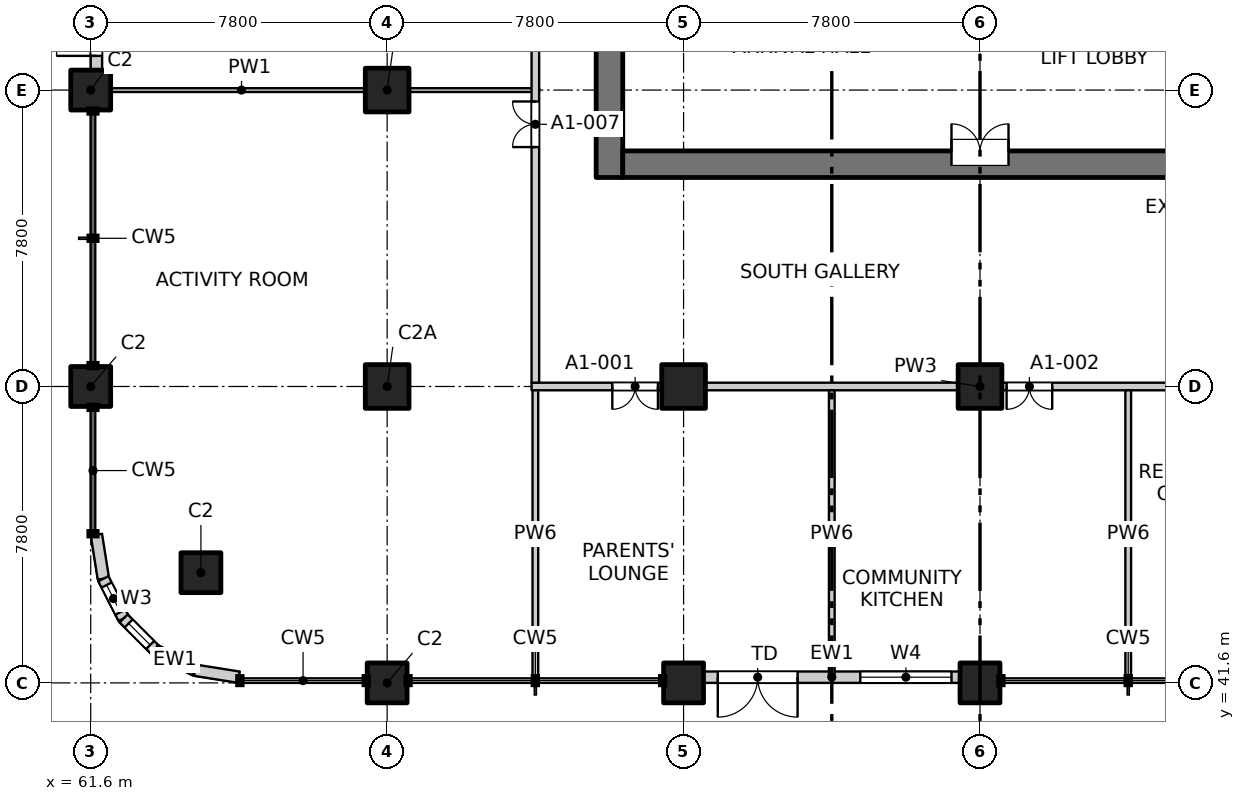
"""IFC4 building model, lengths in metres.
Left out: names, types, materials, properties, quantities, classifications, styles, units other than length and angle.
Written with IfcOpenShell. Run it as: python <this file> out.ifc"""

import sys

from ifc_helpers import new_model, si_unit, direction, frame, frame_2d, origin, origin_2d, place, context, subcontext, project, spatial, rectangle, extrude, element, fill, save


model = new_model("IFC4")
c1 = context("Model", 3, precision=1e-05, world=origin(), true_north=direction((0.0, 1.0)))
c2 = subcontext(c1, "Body", "Model", "MODEL_VIEW")
j1 = project(units=[si_unit("LENGTHUNIT", "METRE"), si_unit("PLANEANGLEUNIT", "RADIAN")], contexts=[c1])
p1 = place(None, origin())
s1 = spatial("IfcSite", under=j1, at=p1, CompositionType="ELEMENT")
p2 = place(p1, origin())
s2 = spatial("IfcBuilding", under=s1, at=p2, CompositionType="ELEMENT")
p3 = place(p2, frame((0.0, 0.0, 15.0)))
s3 = spatial("IfcBuildingStorey", under=s2, at=p3, CompositionType="ELEMENT", Elevation=15.0)
for number, where, z_axis, x_axis in (
    (1, (64.5, 44.5, -0.35), (0.0, 0.0, 1.0), (1.0, 0.0, 0.0)),
    (2, (61.6, 49.4, -0.35), (0.0, 0.0, 1.0), (1.0, 0.0, 0.0)),
    (3, (69.4, 41.6, -0.35), (0.0, 0.0, 1.0), (1.0, 0.0, 0.0)),
    (4, (61.6, 57.2, -0.35), (0.0, 0.0, 1.0), (1.0, 0.0, 0.0)),
    (5, (77.2, 41.6, -0.35), (0.0, 0.0, 1.0), (1.0, 0.0, 0.0)),
    (6, (85.0, 41.6, -0.35), (0.0, 0.0, 1.0), (1.0, 0.0, 0.0)),
):
    element("IfcColumn", number, at=place(p3, frame(where, z_axis=z_axis, x_axis=x_axis)), inside=s3, PredefinedType="COLUMN", context=c2, shape_type="SweptSolid", body=[
        extrude(rectangle(XDim=1.05, YDim=1.05, at=origin_2d()), origin(), (0.0, 0.0, 1.0), 4.6),
    ])
for number, where, z_axis, x_axis in (
    (7, (69.4, 49.4, -0.35), (0.0, 0.0, 1.0), (1.0, 0.0, 0.0)),
    (8, (69.4, 57.2, -0.35), (0.0, 0.0, 1.0), (1.0, 0.0, 0.0)),
    (9, (77.2, 49.4, -0.35), (0.0, 0.0, 1.0), (1.0, 0.0, 0.0)),
    (10, (85.0, 49.4, -0.35), (0.0, 0.0, 1.0), (1.0, 0.0, 0.0)),
):
    element("IfcColumn", number, at=place(p3, frame(where, z_axis=z_axis, x_axis=x_axis)), inside=s3, PredefinedType="COLUMN", context=c2, shape_type="SweptSolid", body=[
        extrude(rectangle(XDim=1.15, YDim=1.15, at=origin_2d()), origin(), (0.0, 0.0, 1.0), 4.6),
    ])
p4 = place(p3, frame((75.25, 54.9, -0.35), z_axis=(0.0, 0.0, 1.0), x_axis=(0.0, 1.0, 0.0)))
e11 = element("IfcWall", 11, at=p4, inside=s3, PredefinedType="SOLIDWALL", context=c2, shape_type="SweptSolid", body=[
    extrude(rectangle(XDim=22.4, YDim=0.7, at=frame_2d((11.2, 0.0))), origin(), (0.0, 0.0, 1.0), 4.6),
])
p5 = place(p4, frame((7.55, 0.0, 0.35)))
e12 = element("IfcOpeningElement", 12, at=p5, cuts=e11, PredefinedType="OPENING", context=c2, shape_type="SweptSolid", body=[
    extrude(rectangle(XDim=0.9, YDim=2.1, at=frame_2d((0.45, 1.05))), frame((0.0, 0.36, 0.0), z_axis=(0.0, -1.0, 0.0), x_axis=(1.0, 0.0, 0.0)), (0.0, 0.0, 1.0), 0.72),
])
p6 = place(p4, frame((10.85, 0.0, 0.35)))
e13 = element("IfcOpeningElement", 13, at=p6, cuts=e11, PredefinedType="OPENING", context=c2, shape_type="SweptSolid", body=[
    extrude(rectangle(XDim=0.9, YDim=2.1, at=frame_2d((0.45, 1.05))), frame((0.0, 0.36, 0.0), z_axis=(0.0, -1.0, 0.0), x_axis=(1.0, 0.0, 0.0)), (0.0, 0.0, 1.0), 0.72),
])
p7 = place(p4, frame((13.85, 0.0, 0.35)))
e14 = element("IfcOpeningElement", 14, at=p7, cuts=e11, PredefinedType="OPENING", context=c2, shape_type="SweptSolid", body=[
    extrude(rectangle(XDim=0.9, YDim=2.1, at=frame_2d((0.45, 1.05))), frame((0.0, 0.36, 0.0), z_axis=(0.0, -1.0, 0.0), x_axis=(1.0, 0.0, 0.0)), (0.0, 0.0, 1.0), 0.72),
])
p8 = place(p4, frame((16.85, 0.0, 0.35)))
e15 = element("IfcOpeningElement", 15, at=p8, cuts=e11, PredefinedType="OPENING", context=c2, shape_type="SweptSolid", body=[
    extrude(rectangle(XDim=0.9, YDim=2.1, at=frame_2d((0.45, 1.05))), frame((0.0, 0.36, 0.0), z_axis=(0.0, -1.0, 0.0), x_axis=(1.0, 0.0, 0.0)), (0.0, 0.0, 1.0), 0.72),
])
p9 = place(p4, frame((20.15, 0.0, 0.35)))
e16 = element("IfcOpeningElement", 16, at=p9, cuts=e11, PredefinedType="OPENING", context=c2, shape_type="SweptSolid", body=[
    extrude(rectangle(XDim=0.9, YDim=2.1, at=frame_2d((0.45, 1.05))), frame((0.0, 0.36, 0.0), z_axis=(0.0, -1.0, 0.0), x_axis=(1.0, 0.0, 0.0)), (0.0, 0.0, 1.0), 0.72),
])
p10 = place(p3, frame((75.6, 55.25, -0.35), z_axis=(0.0, 0.0, 1.0), x_axis=(1.0, 0.0, 0.0)))
e17 = element("IfcWall", 17, at=p10, inside=s3, PredefinedType="SOLIDWALL", context=c2, shape_type="SweptSolid", body=[
    extrude(rectangle(XDim=18.8, YDim=0.7, at=frame_2d((9.4, 0.0))), origin(), (0.0, 0.0, 1.0), 4.6),
])
p11 = place(p10, frame((8.65, 0.0, 0.35)))
e18 = element("IfcOpeningElement", 18, at=p11, cuts=e17, PredefinedType="OPENING", context=c2, shape_type="SweptSolid", body=[
    extrude(rectangle(XDim=1.5, YDim=2.1, at=frame_2d((0.75, 1.05))), frame((0.0, 0.36, 0.0), z_axis=(0.0, -1.0, 0.0), x_axis=(1.0, 0.0, 0.0)), (0.0, 0.0, 1.0), 0.72),
])
p12 = place(p3, frame((77.725, 41.75, 0.0), z_axis=(0.0, 0.0, 1.0), x_axis=(1.0, 0.0, 0.0)))
e19 = element("IfcWall", 19, at=p12, inside=s3, PredefinedType="SOLIDWALL", context=c2, shape_type="SweptSolid", body=[
    extrude(rectangle(XDim=6.75, YDim=0.3, at=frame_2d((3.375, 0.0))), origin(), (0.0, 0.0, 1.0), 3.8),
])
p13 = place(p12, frame((0.375, 0.0, 0.0)))
e20 = element("IfcOpeningElement", 20, at=p13, cuts=e19, PredefinedType="OPENING", context=c2, shape_type="SweptSolid", body=[
    extrude(rectangle(XDim=2.1, YDim=2.4, at=frame_2d((1.05, 1.2))), frame((0.0, 0.16, 0.0), z_axis=(0.0, -1.0, 0.0), x_axis=(1.0, 0.0, 0.0)), (0.0, 0.0, 1.0), 0.32),
])
p14 = place(p12, frame((4.125, 0.0, 0.6)))
e21 = element("IfcOpeningElement", 21, at=p14, cuts=e19, PredefinedType="OPENING", context=c2, shape_type="SweptSolid", body=[
    extrude(rectangle(XDim=2.4, YDim=2.1, at=frame_2d((1.2, 1.05))), frame((0.0, 0.16, 0.0), z_axis=(0.0, -1.0, 0.0), x_axis=(1.0, 0.0, 0.0)), (0.0, 0.0, 1.0), 0.32),
])
p15 = place(p3, frame((61.75, 57.725, 0.0), z_axis=(0.0, 0.0, 1.0), x_axis=(0.0, 1.0, 0.0)))
e22 = element("IfcWall", 22, at=p15, inside=s3, PredefinedType="SOLIDWALL", context=c2, shape_type="SweptSolid", body=[
    extrude(rectangle(XDim=6.75, YDim=0.3, at=frame_2d((3.375, 0.0))), origin(), (0.0, 0.0, 1.0), 3.8),
])
p16 = place(p15, frame((0.375, 0.0, 0.0)))
e23 = element("IfcOpeningElement", 23, at=p16, cuts=e22, PredefinedType="OPENING", context=c2, shape_type="SweptSolid", body=[
    extrude(rectangle(XDim=2.1, YDim=2.4, at=frame_2d((1.05, 1.2))), frame((0.0, 0.16, 0.0), z_axis=(0.0, -1.0, 0.0), x_axis=(1.0, 0.0, 0.0)), (0.0, 0.0, 1.0), 0.32),
])
p17 = place(p15, frame((4.125, 0.0, 0.6)))
e24 = element("IfcOpeningElement", 24, at=p17, cuts=e22, PredefinedType="OPENING", context=c2, shape_type="SweptSolid", body=[
    extrude(rectangle(XDim=2.4, YDim=2.1, at=frame_2d((1.2, 1.05))), frame((0.0, 0.16, 0.0), z_axis=(0.0, -1.0, 0.0), x_axis=(1.0, 0.0, 0.0)), (0.0, 0.0, 1.0), 0.32),
])
p18 = place(p3, frame((61.75, 45.5, 0.0), z_axis=(0.0, 0.0, 1.0), x_axis=(0.156496880861, -0.987678452879, 0.0)))
e25 = element("IfcWall", 25, at=p18, inside=s3, PredefinedType="SOLIDWALL", context=c2, shape_type="SweptSolid", body=[
    extrude(rectangle(XDim=1.173, YDim=0.3, at=frame_2d((0.586, 0.0))), origin(), (0.0, 0.0, 1.0), 3.8),
])
p19 = place(p3, frame((61.934, 44.341, 0.0), z_axis=(0.0, 0.0, 1.0), x_axis=(0.454025524128, -0.890988677504, 0.0)))
e26 = element("IfcWall", 26, at=p19, inside=s3, PredefinedType="SOLIDWALL", context=c2, shape_type="SweptSolid", body=[
    extrude(rectangle(XDim=1.173, YDim=0.3, at=frame_2d((0.587, 0.0))), origin(), (0.0, 0.0, 1.0), 3.8),
])
p20 = place(p19, frame((0.187, 0.0, 0.9)))
e27 = element("IfcOpeningElement", 27, at=p20, cuts=e26, PredefinedType="OPENING", context=c2, shape_type="SweptSolid", body=[
    extrude(rectangle(XDim=0.8, YDim=1.2, at=frame_2d((0.4, 0.6))), frame((0.0, 0.16, 0.0), z_axis=(0.0, -1.0, 0.0), x_axis=(1.0, 0.0, 0.0)), (0.0, 0.0, 1.0), 0.32),
])
p21 = place(p3, frame((62.466, 43.296, 0.0), z_axis=(0.0, 0.0, 1.0), x_axis=(0.707106781187, -0.707106781187, 0.0)))
e28 = element("IfcWall", 28, at=p21, inside=s3, PredefinedType="SOLIDWALL", context=c2, shape_type="SweptSolid", body=[
    extrude(rectangle(XDim=1.173, YDim=0.3, at=frame_2d((0.586, 0.0))), origin(), (0.0, 0.0, 1.0), 3.8),
])
p22 = place(p21, frame((0.187, 0.0, 0.9)))
e29 = element("IfcOpeningElement", 29, at=p22, cuts=e28, PredefinedType="OPENING", context=c2, shape_type="SweptSolid", body=[
    extrude(rectangle(XDim=0.8, YDim=1.2, at=frame_2d((0.4, 0.6))), frame((0.0, 0.16, 0.0), z_axis=(0.0, -1.0, 0.0), x_axis=(1.0, 0.0, 0.0)), (0.0, 0.0, 1.0), 0.32),
])
p23 = place(p3, frame((63.296, 42.466, 0.0), z_axis=(0.0, 0.0, 1.0), x_axis=(0.890988677504, -0.454025524128, 0.0)))
e30 = element("IfcWall", 30, at=p23, inside=s3, PredefinedType="SOLIDWALL", context=c2, shape_type="SweptSolid", body=[
    extrude(rectangle(XDim=1.173, YDim=0.3, at=frame_2d((0.587, 0.0))), origin(), (0.0, 0.0, 1.0), 3.8),
])
p24 = place(p23, frame((0.187, 0.0, 0.9)))
e31 = element("IfcOpeningElement", 31, at=p24, cuts=e30, PredefinedType="OPENING", context=c2, shape_type="SweptSolid", body=[
    extrude(rectangle(XDim=0.8, YDim=1.2, at=frame_2d((0.4, 0.6))), frame((0.0, 0.16, 0.0), z_axis=(0.0, -1.0, 0.0), x_axis=(1.0, 0.0, 0.0)), (0.0, 0.0, 1.0), 0.32),
])
p25 = place(p3, frame((64.341, 41.934, 0.0), z_axis=(0.0, 0.0, 1.0), x_axis=(0.987678452879, -0.156496880861, 0.0)))
e32 = element("IfcWall", 32, at=p25, inside=s3, PredefinedType="SOLIDWALL", context=c2, shape_type="SweptSolid", body=[
    extrude(rectangle(XDim=1.173, YDim=0.3, at=frame_2d((0.586, 0.0))), origin(), (0.0, 0.0, 1.0), 3.8),
])
p26 = place(p3, frame((73.2, 49.4, 0.0), z_axis=(0.0, 0.0, 1.0), x_axis=(1.0, 0.0, 0.0)))
e33 = element("IfcWall", 33, at=p26, inside=s3, PredefinedType="PARTITIONING", context=c2, shape_type="SweptSolid", body=[
    extrude(rectangle(XDim=23.6, YDim=0.2, at=frame_2d((11.8, 0.0))), origin(), (0.0, 0.0, 1.0), 4.25),
])
p27 = place(p26, frame((2.125, 0.0, 0.0)))
e34 = element("IfcOpeningElement", 34, at=p27, cuts=e33, PredefinedType="OPENING", context=c2, shape_type="SweptSolid", body=[
    extrude(rectangle(XDim=1.2, YDim=2.1, at=frame_2d((0.6, 1.05))), frame((0.0, 0.11, 0.0), z_axis=(0.0, -1.0, 0.0), x_axis=(1.0, 0.0, 0.0)), (0.0, 0.0, 1.0), 0.22),
])
p28 = place(p26, frame((12.5, 0.0, 0.0)))
e35 = element("IfcOpeningElement", 35, at=p28, cuts=e33, PredefinedType="OPENING", context=c2, shape_type="SweptSolid", body=[
    extrude(rectangle(XDim=1.2, YDim=2.1, at=frame_2d((0.6, 1.05))), frame((0.0, 0.11, 0.0), z_axis=(0.0, -1.0, 0.0), x_axis=(1.0, 0.0, 0.0)), (0.0, 0.0, 1.0), 0.22),
])
p29 = place(p26, frame((20.275, 0.0, 0.0)))
e36 = element("IfcOpeningElement", 36, at=p29, cuts=e33, PredefinedType="OPENING", context=c2, shape_type="SweptSolid", body=[
    extrude(rectangle(XDim=1.2, YDim=2.1, at=frame_2d((0.6, 1.05))), frame((0.0, 0.11, 0.0), z_axis=(0.0, -1.0, 0.0), x_axis=(1.0, 0.0, 0.0)), (0.0, 0.0, 1.0), 0.22),
])
p30 = place(p3, frame((61.735, 57.2, 0.0), z_axis=(0.0, 0.0, 1.0), x_axis=(1.0, 0.0, 0.0)))
e37 = element("IfcWall", 37, at=p30, inside=s3, PredefinedType="PARTITIONING", context=c2, shape_type="SweptSolid", body=[
    extrude(rectangle(XDim=7.665, YDim=0.1, at=frame_2d((3.833, 0.0))), origin(), (0.0, 0.0, 1.0), 3.65),
])
p31 = place(p3, frame((69.4, 57.2, 0.0), z_axis=(0.0, 0.0, 1.0), x_axis=(1.0, 0.0, 0.0)))
e38 = element("IfcWall", 38, at=p31, inside=s3, PredefinedType="PARTITIONING", context=c2, shape_type="SweptSolid", body=[
    extrude(rectangle(XDim=4.0, YDim=0.1, at=frame_2d((2.0, 0.0))), origin(), (0.0, 0.0, 1.0), 4.25),
])
p32 = place(p3, frame((73.3, 41.735, 0.0), z_axis=(0.0, 0.0, 1.0), x_axis=(0.0, 1.0, 0.0)))
e39 = element("IfcWall", 39, at=p32, inside=s3, PredefinedType="PARTITIONING", context=c2, shape_type="SweptSolid", body=[
    extrude(rectangle(XDim=7.565, YDim=0.15, at=frame_2d((3.782, 0.0))), origin(), (0.0, 0.0, 1.0), 4.25),
])
p33 = place(p3, frame((73.3, 49.5, 0.0), z_axis=(0.0, 0.0, 1.0), x_axis=(0.0, 1.0, 0.0)))
e40 = element("IfcWall", 40, at=p33, inside=s3, PredefinedType="PARTITIONING", context=c2, shape_type="SweptSolid", body=[
    extrude(rectangle(XDim=34.9, YDim=0.2, at=frame_2d((17.45, 0.0))), origin(), (0.0, 0.0, 1.0), 4.25),
])
p34 = place(p33, frame((6.2, 0.0, 0.0)))
e41 = element("IfcOpeningElement", 41, at=p34, cuts=e40, PredefinedType="OPENING", context=c2, shape_type="SweptSolid", body=[
    extrude(rectangle(XDim=1.2, YDim=2.1, at=frame_2d((0.6, 1.05))), frame((0.0, 0.11, 0.0), z_axis=(0.0, -1.0, 0.0), x_axis=(1.0, 0.0, 0.0)), (0.0, 0.0, 1.0), 0.22),
])
p35 = place(p33, frame((9.05, 0.0, 0.0)))
e42 = element("IfcOpeningElement", 42, at=p35, cuts=e40, PredefinedType="OPENING", context=c2, shape_type="SweptSolid", body=[
    extrude(rectangle(XDim=1.2, YDim=2.1, at=frame_2d((0.6, 1.05))), frame((0.0, 0.11, 0.0), z_axis=(0.0, -1.0, 0.0), x_axis=(1.0, 0.0, 0.0)), (0.0, 0.0, 1.0), 0.22),
])
p36 = place(p33, frame((28.55, 0.0, 0.0)))
e43 = element("IfcOpeningElement", 43, at=p36, cuts=e40, PredefinedType="OPENING", context=c2, shape_type="SweptSolid", body=[
    extrude(rectangle(XDim=1.2, YDim=2.1, at=frame_2d((0.6, 1.05))), frame((0.0, 0.11, 0.0), z_axis=(0.0, -1.0, 0.0), x_axis=(1.0, 0.0, 0.0)), (0.0, 0.0, 1.0), 0.22),
])
p37 = place(p33, frame((32.45, 0.0, 0.0)))
e44 = element("IfcOpeningElement", 44, at=p37, cuts=e40, PredefinedType="OPENING", context=c2, shape_type="SweptSolid", body=[
    extrude(rectangle(XDim=1.2, YDim=2.1, at=frame_2d((0.6, 1.05))), frame((0.0, 0.11, 0.0), z_axis=(0.0, -1.0, 0.0), x_axis=(1.0, 0.0, 0.0)), (0.0, 0.0, 1.0), 0.22),
])
for number, where, z_axis, x_axis in (
    (45, (81.1, 41.735, 0.0), (0.0, 0.0, 1.0), (0.0, 1.0, 0.0)),
    (46, (88.9, 41.735, 0.0), (0.0, 0.0, 1.0), (0.0, 1.0, 0.0)),
):
    element("IfcWall", number, at=place(p3, frame(where, z_axis=z_axis, x_axis=x_axis)), inside=s3, PredefinedType="PARTITIONING", context=c2, shape_type="SweptSolid", body=[
        extrude(rectangle(XDim=7.565, YDim=0.15, at=frame_2d((3.782, 0.0))), origin(), (0.0, 0.0, 1.0), 4.25),
    ])
p38 = place(p13, frame((2.1, 0.0, 0.0), z_axis=(0.0, 0.0, 1.0), x_axis=(-1.0, 0.0, 0.0)))
e47 = element("IfcDoor", 47, at=p38, inside=s3, OperationType="DOUBLE_DOOR_SINGLE_SWING", PredefinedType="DOOR", context=c2, shape_type="SweptSolid", body=[
    extrude(rectangle(XDim=2.1, YDim=2.4, at=frame_2d((1.05, 1.2))), frame((0.0, 0.025, 0.0), z_axis=(0.0, -1.0, 0.0), x_axis=(1.0, 0.0, 0.0)), (0.0, 0.0, 1.0), 0.05),
])
fill(e20, e47)
p39 = place(p14, origin())
e48 = element("IfcWindow", 48, at=p39, inside=s3, PartitioningType="SINGLE_PANEL", PredefinedType="WINDOW", context=c2, shape_type="SweptSolid", body=[
    extrude(rectangle(XDim=2.4, YDim=2.1, at=frame_2d((1.2, 1.05))), frame((0.0, 0.03, 0.0), z_axis=(0.0, -1.0, 0.0), x_axis=(1.0, 0.0, 0.0)), (0.0, 0.0, 1.0), 0.06),
])
fill(e21, e48)
p40 = place(p16, origin())
e49 = element("IfcDoor", 49, at=p40, inside=s3, OperationType="DOUBLE_DOOR_SINGLE_SWING", PredefinedType="DOOR", context=c2, shape_type="SweptSolid", body=[
    extrude(rectangle(XDim=2.1, YDim=2.4, at=frame_2d((1.05, 1.2))), frame((0.0, 0.025, 0.0), z_axis=(0.0, -1.0, 0.0), x_axis=(1.0, 0.0, 0.0)), (0.0, 0.0, 1.0), 0.05),
])
fill(e23, e49)
p41 = place(p20, origin())
e50 = element("IfcWindow", 50, at=p41, inside=s3, PartitioningType="SINGLE_PANEL", PredefinedType="WINDOW", context=c2, shape_type="SweptSolid", body=[
    extrude(rectangle(XDim=0.8, YDim=1.2, at=frame_2d((0.4, 0.6))), frame((0.0, 0.03, 0.0), z_axis=(0.0, -1.0, 0.0), x_axis=(1.0, 0.0, 0.0)), (0.0, 0.0, 1.0), 0.06),
])
fill(e27, e50)
p42 = place(p22, origin())
e51 = element("IfcWindow", 51, at=p42, inside=s3, PartitioningType="SINGLE_PANEL", PredefinedType="WINDOW", context=c2, shape_type="SweptSolid", body=[
    extrude(rectangle(XDim=0.8, YDim=1.2, at=frame_2d((0.4, 0.6))), frame((0.0, 0.03, 0.0), z_axis=(0.0, -1.0, 0.0), x_axis=(1.0, 0.0, 0.0)), (0.0, 0.0, 1.0), 0.06),
])
fill(e29, e51)
p43 = place(p24, origin())
e52 = element("IfcWindow", 52, at=p43, inside=s3, PartitioningType="SINGLE_PANEL", PredefinedType="WINDOW", context=c2, shape_type="SweptSolid", body=[
    extrude(rectangle(XDim=0.8, YDim=1.2, at=frame_2d((0.4, 0.6))), frame((0.0, 0.03, 0.0), z_axis=(0.0, -1.0, 0.0), x_axis=(1.0, 0.0, 0.0)), (0.0, 0.0, 1.0), 0.06),
])
fill(e31, e52)
p44 = place(p27, origin())
e53 = element("IfcDoor", 53, at=p44, inside=s3, OperationType="DOUBLE_DOOR_SINGLE_SWING", PredefinedType="DOOR", context=c2, shape_type="SweptSolid", body=[
    extrude(rectangle(XDim=1.2, YDim=2.1, at=frame_2d((0.6, 1.05))), frame((0.0, 0.025, 0.0), z_axis=(0.0, -1.0, 0.0), x_axis=(1.0, 0.0, 0.0)), (0.0, 0.0, 1.0), 0.05),
])
fill(e34, e53)
p45 = place(p28, origin())
e54 = element("IfcDoor", 54, at=p45, inside=s3, OperationType="DOUBLE_DOOR_SINGLE_SWING", PredefinedType="DOOR", context=c2, shape_type="SweptSolid", body=[
    extrude(rectangle(XDim=1.2, YDim=2.1, at=frame_2d((0.6, 1.05))), frame((0.0, 0.025, 0.0), z_axis=(0.0, -1.0, 0.0), x_axis=(1.0, 0.0, 0.0)), (0.0, 0.0, 1.0), 0.05),
])
fill(e35, e54)
p46 = place(p11, origin())
e55 = element("IfcDoor", 55, at=p46, inside=s3, OperationType="DOUBLE_DOOR_SINGLE_SWING", PredefinedType="DOOR", context=c2, shape_type="SweptSolid", body=[
    extrude(rectangle(XDim=1.5, YDim=2.1, at=frame_2d((0.75, 1.05))), frame((0.0, 0.335, 0.0), z_axis=(0.0, -1.0, 0.0), x_axis=(1.0, 0.0, 0.0)), (0.0, 0.0, 1.0), 0.05),
])
fill(e18, e55)
p47 = place(p34, origin())
e56 = element("IfcDoor", 56, at=p47, inside=s3, OperationType="DOUBLE_DOOR_SINGLE_SWING", PredefinedType="DOOR", context=c2, shape_type="SweptSolid", body=[
    extrude(rectangle(XDim=1.2, YDim=2.1, at=frame_2d((0.6, 1.05))), frame((0.0, 0.025, 0.0), z_axis=(0.0, -1.0, 0.0), x_axis=(1.0, 0.0, 0.0)), (0.0, 0.0, 1.0), 0.05),
])
fill(e41, e56)
save(model, sys.argv[1])
